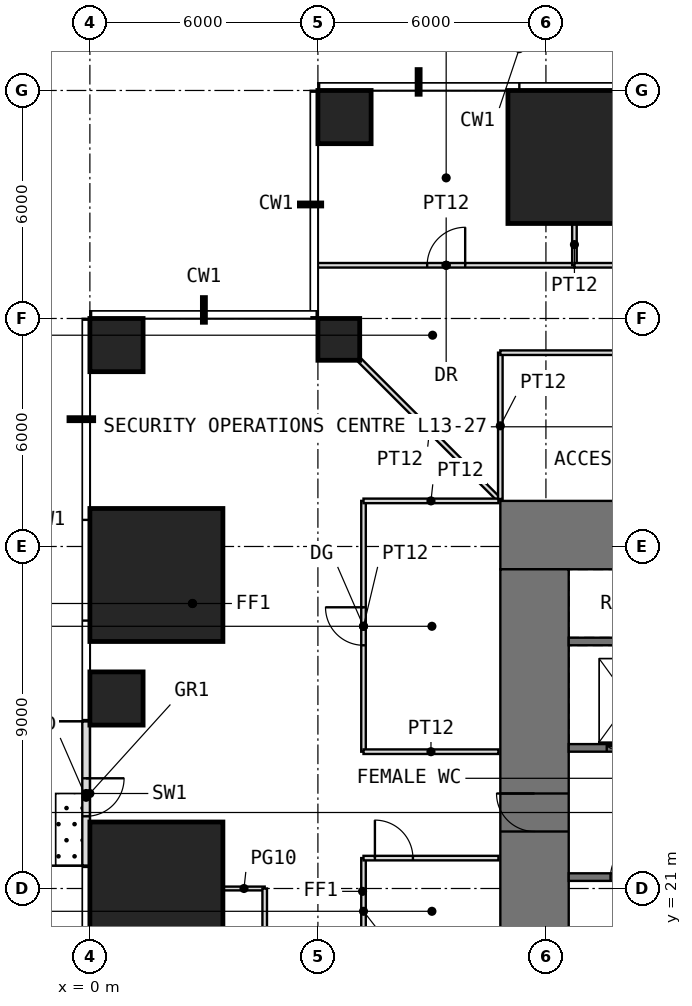
"""IFC4 building model, lengths in metres.
Left out: names, types, materials, properties, quantities, classifications, styles, units other than length and angle.
Written with IfcOpenShell. Run it as: python <this file> out.ifc"""

import sys

from ifc_helpers import new_model, si_unit, direction, frame, frame_2d, origin, origin_2d, place, context, subcontext, project, spatial, rectangle, extrude, element, fill, save


model = new_model("IFC4")
c1 = context("Model", 3, precision=1e-05, world=origin(), true_north=direction((0.0, 1.0)))
c2 = subcontext(c1, "Body", "Model", "MODEL_VIEW")
j1 = project(units=[si_unit("LENGTHUNIT", "METRE"), si_unit("PLANEANGLEUNIT", "RADIAN")], contexts=[c1])
p1 = place(None, origin())
s1 = spatial("IfcSite", under=j1, at=p1, CompositionType="ELEMENT")
p2 = place(p1, origin())
s2 = spatial("IfcBuilding", under=s1, at=p2, CompositionType="ELEMENT")
p3 = place(p2, frame((0.0, 0.0, 58.5)))
s3 = spatial("IfcBuildingStorey", under=s2, at=p3, CompositionType="ELEMENT", Elevation=58.5)
p4 = place(p3, frame((1.75, 21.0, 0.0), z_axis=(0.0, 0.0, 1.0), x_axis=(1.0, 0.0, 0.0)))
e1 = element("IfcColumn", 1, at=p4, inside=s3, PredefinedType="COLUMN", context=c2, shape_type="SweptSolid", body=[
    extrude(rectangle(XDim=3.5, YDim=3.5, at=origin_2d()), origin(), (0.0, 0.0, 1.0), 4.0),
])
p5 = place(p3, frame((0.7, 26.0, 0.0), z_axis=(0.0, 0.0, 1.0), x_axis=(1.0, 0.0, 0.0)))
e2 = element("IfcColumn", 2, at=p5, inside=s3, PredefinedType="COLUMN", context=c2, shape_type="SweptSolid", body=[
    extrude(rectangle(XDim=1.4, YDim=1.4, at=origin_2d()), origin(), (0.0, 0.0, 1.0), 4.0),
])
p6 = place(p3, frame((1.75, 29.25, 0.0), z_axis=(0.0, 0.0, 1.0), x_axis=(1.0, 0.0, 0.0)))
e3 = element("IfcColumn", 3, at=p6, inside=s3, PredefinedType="COLUMN", context=c2, shape_type="SweptSolid", body=[
    extrude(rectangle(XDim=3.5, YDim=3.5, at=origin_2d()), origin(), (0.0, 0.0, 1.0), 4.0),
])
p7 = place(p3, frame((0.7, 35.3, 0.0), z_axis=(0.0, 0.0, 1.0), x_axis=(1.0, 0.0, 0.0)))
e4 = element("IfcColumn", 4, at=p7, inside=s3, PredefinedType="COLUMN", context=c2, shape_type="SweptSolid", body=[
    extrude(rectangle(XDim=1.4, YDim=1.4, at=origin_2d()), origin(), (0.0, 0.0, 1.0), 4.0),
])
p8 = place(p3, frame((6.55, 35.45, 0.0), z_axis=(0.0, 0.0, 1.0), x_axis=(1.0, 0.0, 0.0)))
e5 = element("IfcColumn", 5, at=p8, inside=s3, PredefinedType="COLUMN", context=c2, shape_type="SweptSolid", body=[
    extrude(rectangle(XDim=1.1, YDim=1.1, at=origin_2d()), origin(), (0.0, 0.0, 1.0), 4.0),
])
p9 = place(p3, frame((6.7, 41.3, 0.0), z_axis=(0.0, 0.0, 1.0), x_axis=(1.0, 0.0, 0.0)))
e6 = element("IfcColumn", 6, at=p9, inside=s3, PredefinedType="COLUMN", context=c2, shape_type="SweptSolid", body=[
    extrude(rectangle(XDim=1.4, YDim=1.4, at=origin_2d()), origin(), (0.0, 0.0, 1.0), 4.0),
])
p10 = place(p3, frame((12.75, 40.25, 0.0), z_axis=(0.0, 0.0, 1.0), x_axis=(1.0, 0.0, 0.0)))
e7 = element("IfcColumn", 7, at=p10, inside=s3, PredefinedType="COLUMN", context=c2, shape_type="SweptSolid", body=[
    extrude(rectangle(XDim=3.5, YDim=3.5, at=origin_2d()), origin(), (0.0, 0.0, 1.0), 4.0),
])
p11 = place(p3, frame((-0.1, 25.4, 0.0), z_axis=(0.0, 0.0, 1.0), x_axis=(0.0, -1.0, 0.0)))
e8 = element("IfcWall", 8, at=p11, inside=s3, PredefinedType="USERDEFINED", context=c2, shape_type="SweptSolid", body=[
    extrude(rectangle(XDim=3.8, YDim=0.2, at=frame_2d((1.9, 0.0))), origin(), (0.0, 0.0, 1.0), 3.75),
])
p12 = place(p11, frame((1.5, 0.0, 0.0)))
e9 = element("IfcOpeningElement", 9, at=p12, cuts=e8, PredefinedType="OPENING", context=c2, shape_type="SweptSolid", body=[
    extrude(rectangle(XDim=1.0, YDim=2.4, at=frame_2d((0.5, 1.2))), frame((0.0, 0.11, 0.0), z_axis=(0.0, -1.0, 0.0), x_axis=(1.0, 0.0, 0.0)), (0.0, 0.0, 1.0), 0.22),
])
p13 = place(p3, frame((10.8, 30.3, -0.05), z_axis=(0.0, 0.0, 1.0), x_axis=(1.0, 0.0, 0.0)))
e10 = element("IfcWall", 10, at=p13, inside=s3, PredefinedType="SHEAR", context=c2, shape_type="SweptSolid", body=[
    extrude(rectangle(XDim=20.4, YDim=1.8, at=frame_2d((10.2, 0.0))), origin(), (0.0, 0.0, 1.0), 4.0),
])
p14 = place(p13, frame((9.2, 0.0, 0.05)))
e11 = element("IfcOpeningElement", 11, at=p14, cuts=e10, PredefinedType="OPENING", context=c2, shape_type="SweptSolid", body=[
    extrude(rectangle(XDim=2.0, YDim=2.2, at=frame_2d((1.0, 1.1))), frame((0.0, 0.91, 0.0), z_axis=(0.0, -1.0, 0.0), x_axis=(1.0, 0.0, 0.0)), (0.0, 0.0, 1.0), 1.82),
])
p15 = place(p3, frame((11.7, 12.6, -0.05), z_axis=(0.0, 0.0, 1.0), x_axis=(0.0, 1.0, 0.0)))
e12 = element("IfcWall", 12, at=p15, inside=s3, PredefinedType="SHEAR", context=c2, shape_type="SweptSolid", body=[
    extrude(rectangle(XDim=16.8, YDim=1.8, at=frame_2d((8.4, 0.0))), origin(), (0.0, 0.0, 1.0), 4.0),
])
p16 = place(p15, frame((9.9, 0.0, 0.05)))
e13 = element("IfcOpeningElement", 13, at=p16, cuts=e12, PredefinedType="OPENING", context=c2, shape_type="SweptSolid", body=[
    extrude(rectangle(XDim=1.0, YDim=2.2, at=frame_2d((0.5, 1.1))), frame((0.0, 0.91, 0.0), z_axis=(0.0, -1.0, 0.0), x_axis=(1.0, 0.0, 0.0)), (0.0, 0.0, 1.0), 1.82),
])
p17 = place(p3, frame((12.6, 21.3, -0.05), z_axis=(0.0, 0.0, 1.0), x_axis=(1.0, 0.0, 0.0)))
e14 = element("IfcWall", 14, at=p17, inside=s3, PredefinedType="SHEAR", context=c2, shape_type="SweptSolid", body=[
    extrude(rectangle(XDim=3.2, YDim=0.2, at=frame_2d((1.6, 0.0))), origin(), (0.0, 0.0, 1.0), 4.0),
])
p18 = place(p17, frame((1.1, 0.0, 0.05)))
e15 = element("IfcOpeningElement", 15, at=p18, cuts=e14, PredefinedType="OPENING", context=c2, shape_type="SweptSolid", body=[
    extrude(rectangle(XDim=1.0, YDim=2.2, at=frame_2d((0.5, 1.1))), frame((0.0, 0.11, 0.0), z_axis=(0.0, -1.0, 0.0), x_axis=(1.0, 0.0, 0.0)), (0.0, 0.0, 1.0), 0.22),
])
p19 = place(p3, frame((12.6, 24.7, -0.05), z_axis=(0.0, 0.0, 1.0), x_axis=(1.0, 0.0, 0.0)))
e16 = element("IfcWall", 16, at=p19, inside=s3, PredefinedType="SHEAR", context=c2, shape_type="SweptSolid", body=[
    extrude(rectangle(XDim=3.2, YDim=0.2, at=frame_2d((1.6, 0.0))), origin(), (0.0, 0.0, 1.0), 4.0),
])
p20 = place(p19, frame((1.0, 0.0, 0.05)))
e17 = element("IfcOpeningElement", 17, at=p20, cuts=e16, PredefinedType="OPENING", context=c2, shape_type="SweptSolid", body=[
    extrude(rectangle(XDim=1.2, YDim=2.2, at=frame_2d((0.6, 1.1))), frame((0.0, 0.11, 0.0), z_axis=(0.0, -1.0, 0.0), x_axis=(1.0, 0.0, 0.0)), (0.0, 0.0, 1.0), 0.22),
])
p21 = place(p3, frame((12.6, 27.5, -0.05), z_axis=(0.0, 0.0, 1.0), x_axis=(1.0, 0.0, 0.0)))
e18 = element("IfcWall", 18, at=p21, inside=s3, PredefinedType="SHEAR", context=c2, shape_type="SweptSolid", body=[
    extrude(rectangle(XDim=3.2, YDim=0.2, at=frame_2d((1.6, 0.0))), origin(), (0.0, 0.0, 1.0), 4.0),
])
p22 = place(p3, frame((3.51, 21.0, 0.0), z_axis=(0.0, 0.0, 1.0), x_axis=(1.0, 0.0, 0.0)))
e19 = element("IfcWall", 19, at=p22, inside=s3, PredefinedType="PARTITIONING", context=c2, shape_type="SweptSolid", body=[
    extrude(rectangle(XDim=1.09, YDim=0.1, at=frame_2d((0.545, 0.0))), origin(), (0.0, 0.0, 1.0), 3.75),
])
p23 = place(p3, frame((4.6, 16.0, 0.0), z_axis=(0.0, 0.0, 1.0), x_axis=(0.0, 1.0, 0.0)))
e20 = element("IfcWall", 20, at=p23, inside=s3, PredefinedType="PARTITIONING", context=c2, shape_type="SweptSolid", body=[
    extrude(rectangle(XDim=5.0, YDim=0.12, at=frame_2d((2.5, 0.0))), origin(), (0.0, 0.0, 1.0), 3.75),
])
p24 = place(p23, frame((2.1, 0.0, 0.0)))
e21 = element("IfcOpeningElement", 21, at=p24, cuts=e20, PredefinedType="OPENING", context=c2, shape_type="SweptSolid", body=[
    extrude(rectangle(XDim=1.0, YDim=2.4, at=frame_2d((0.5, 1.2))), frame((0.0, 0.07, 0.0), z_axis=(0.0, -1.0, 0.0), x_axis=(1.0, 0.0, 0.0)), (0.0, 0.0, 1.0), 0.14),
])
p25 = place(p3, frame((6.0, 37.4, 0.0), z_axis=(0.0, 0.0, 1.0), x_axis=(1.0, 0.0, 0.0)))
e22 = element("IfcWall", 22, at=p25, inside=s3, PredefinedType="PARTITIONING", context=c2, shape_type="SweptSolid", body=[
    extrude(rectangle(XDim=6.75, YDim=0.12, at=frame_2d((3.375, 0.0))), origin(), (0.0, 0.0, 1.0), 3.75),
])
p26 = place(p25, frame((2.875, 0.0, 0.0)))
e23 = element("IfcOpeningElement", 23, at=p26, cuts=e22, PredefinedType="OPENING", context=c2, shape_type="SweptSolid", body=[
    extrude(rectangle(XDim=1.0, YDim=2.2, at=frame_2d((0.5, 1.1))), frame((0.0, 0.07, 0.0), z_axis=(0.0, -1.0, 0.0), x_axis=(1.0, 0.0, 0.0)), (0.0, 0.0, 1.0), 0.14),
])
p27 = place(p3, frame((7.11, 34.89, 0.0), z_axis=(0.0, 0.0, 1.0), x_axis=(0.707106781187, -0.707106781187, 0.0)))
e24 = element("IfcWall", 24, at=p27, inside=s3, PredefinedType="PARTITIONING", context=c2, shape_type="SweptSolid", body=[
    extrude(rectangle(XDim=5.168, YDim=0.12, at=frame_2d((2.584, 0.0))), origin(), (0.0, 0.0, 1.0), 3.75),
])
p28 = place(p3, frame((7.2, 19.0, 0.0), z_axis=(0.0, 0.0, 1.0), x_axis=(0.0, 1.0, 0.0)))
e25 = element("IfcWall", 25, at=p28, inside=s3, PredefinedType="PARTITIONING", context=c2, shape_type="SweptSolid", body=[
    extrude(rectangle(XDim=2.8, YDim=0.12, at=frame_2d((1.4, 0.0))), origin(), (0.0, 0.0, 1.0), 3.75),
])
p29 = place(p3, frame((7.2, 21.8, 0.0), z_axis=(0.0, 0.0, 1.0), x_axis=(1.0, 0.0, 0.0)))
e26 = element("IfcWall", 26, at=p29, inside=s3, PredefinedType="PARTITIONING", context=c2, shape_type="SweptSolid", body=[
    extrude(rectangle(XDim=3.55, YDim=0.12, at=frame_2d((1.775, 0.0))), origin(), (0.0, 0.0, 1.0), 3.75),
])
p30 = place(p29, frame((0.3, 0.0, 0.0)))
e27 = element("IfcOpeningElement", 27, at=p30, cuts=e26, PredefinedType="OPENING", context=c2, shape_type="SweptSolid", body=[
    extrude(rectangle(XDim=1.0, YDim=2.4, at=frame_2d((0.5, 1.2))), frame((0.0, 0.07, 0.0), z_axis=(0.0, -1.0, 0.0), x_axis=(1.0, 0.0, 0.0)), (0.0, 0.0, 1.0), 0.14),
])
p31 = place(p3, frame((7.2, 24.6, 0.0), z_axis=(0.0, 0.0, 1.0), x_axis=(0.0, 1.0, 0.0)))
e28 = element("IfcWall", 28, at=p31, inside=s3, PredefinedType="PARTITIONING", context=c2, shape_type="SweptSolid", body=[
    extrude(rectangle(XDim=6.6, YDim=0.12, at=frame_2d((3.3, 0.0))), origin(), (0.0, 0.0, 1.0), 3.75),
])
p32 = place(p31, frame((2.8, 0.0, 0.0)))
e29 = element("IfcOpeningElement", 29, at=p32, cuts=e28, PredefinedType="OPENING", context=c2, shape_type="SweptSolid", body=[
    extrude(rectangle(XDim=1.0, YDim=2.4, at=frame_2d((0.5, 1.2))), frame((0.0, 0.07, 0.0), z_axis=(0.0, -1.0, 0.0), x_axis=(1.0, 0.0, 0.0)), (0.0, 0.0, 1.0), 0.14),
])
for number, where, z_axis, x_axis in (
    (30, (7.2, 24.6, 0.0), (0.0, 0.0, 1.0), (1.0, 0.0, 0.0)),
    (31, (7.2, 31.2, 0.0), (0.0, 0.0, 1.0), (1.0, 0.0, 0.0)),
):
    element("IfcWall", number, at=place(p3, frame(where, z_axis=z_axis, x_axis=x_axis)), inside=s3, PredefinedType="PARTITIONING", context=c2, shape_type="SweptSolid", body=[
        extrude(rectangle(XDim=3.55, YDim=0.12, at=frame_2d((1.775, 0.0))), origin(), (0.0, 0.0, 1.0), 3.75),
    ])
p33 = place(p3, frame((10.8, 31.25, 0.0), z_axis=(0.0, 0.0, 1.0), x_axis=(0.0, 1.0, 0.0)))
e32 = element("IfcWall", 32, at=p33, inside=s3, PredefinedType="PARTITIONING", context=c2, shape_type="SweptSolid", body=[
    extrude(rectangle(XDim=3.85, YDim=0.12, at=frame_2d((1.925, 0.0))), origin(), (0.0, 0.0, 1.0), 3.75),
])
p34 = place(p3, frame((10.8, 35.1, 0.0), z_axis=(0.0, 0.0, 1.0), x_axis=(1.0, 0.0, 0.0)))
e33 = element("IfcWall", 33, at=p34, inside=s3, PredefinedType="PARTITIONING", context=c2, shape_type="SweptSolid", body=[
    extrude(rectangle(XDim=7.6, YDim=0.12, at=frame_2d((3.8, 0.0))), origin(), (0.0, 0.0, 1.0), 3.75),
])
p35 = place(p34, frame((3.3, 0.0, 0.0)))
e34 = element("IfcOpeningElement", 34, at=p35, cuts=e33, PredefinedType="OPENING", context=c2, shape_type="SweptSolid", body=[
    extrude(rectangle(XDim=1.0, YDim=2.2, at=frame_2d((0.5, 1.1))), frame((0.0, 0.07, 0.0), z_axis=(0.0, -1.0, 0.0), x_axis=(1.0, 0.0, 0.0)), (0.0, 0.0, 1.0), 0.14),
])
p36 = place(p3, frame((12.75, 37.4, 0.0), z_axis=(0.0, 0.0, 1.0), x_axis=(0.0, 1.0, 0.0)))
e35 = element("IfcWall", 35, at=p36, inside=s3, PredefinedType="PARTITIONING", context=c2, shape_type="SweptSolid", body=[
    extrude(rectangle(XDim=1.09, YDim=0.12, at=frame_2d((0.545, 0.0))), origin(), (0.0, 0.0, 1.0), 3.75),
])
p37 = place(p3, frame((12.75, 37.4, 0.0), z_axis=(0.0, 0.0, 1.0), x_axis=(1.0, 0.0, 0.0)))
e36 = element("IfcWall", 36, at=p37, inside=s3, PredefinedType="PARTITIONING", context=c2, shape_type="SweptSolid", body=[
    extrude(rectangle(XDim=8.25, YDim=0.12, at=frame_2d((4.125, 0.0))), origin(), (0.0, 0.0, 1.0), 3.75),
])
p38 = place(p37, frame((3.625, 0.0, 0.0)))
e37 = element("IfcOpeningElement", 37, at=p38, cuts=e36, PredefinedType="OPENING", context=c2, shape_type="SweptSolid", body=[
    extrude(rectangle(XDim=1.0, YDim=2.4, at=frame_2d((0.5, 1.2))), frame((0.0, 0.07, 0.0), z_axis=(0.0, -1.0, 0.0), x_axis=(1.0, 0.0, 0.0)), (0.0, 0.0, 1.0), 0.14),
])
p39 = place(p12, origin())
e38 = element("IfcDoor", 38, at=p39, inside=s3, OperationType="SINGLE_SWING_LEFT", PredefinedType="DOOR", context=c2, shape_type="SweptSolid", body=[
    extrude(rectangle(XDim=1.0, YDim=2.4, at=frame_2d((0.5, 1.2))), frame((0.0, 0.025, 0.0), z_axis=(0.0, -1.0, 0.0), x_axis=(1.0, 0.0, 0.0)), (0.0, 0.0, 1.0), 0.05),
])
fill(e9, e38)
p40 = place(p16, origin())
e39 = element("IfcDoor", 39, at=p40, inside=s3, OperationType="SINGLE_SWING_RIGHT", PredefinedType="DOOR", context=c2, shape_type="SweptSolid", body=[
    extrude(rectangle(XDim=1.0, YDim=2.2, at=frame_2d((0.5, 1.1))), frame((0.0, 0.025, 0.0), z_axis=(0.0, -1.0, 0.0), x_axis=(1.0, 0.0, 0.0)), (0.0, 0.0, 1.0), 0.05),
])
fill(e13, e39)
p41 = place(p18, origin())
e40 = element("IfcDoor", 40, at=p41, inside=s3, OperationType="SINGLE_SWING_RIGHT", PredefinedType="DOOR", context=c2, shape_type="SweptSolid", body=[
    extrude(rectangle(XDim=1.0, YDim=2.2, at=frame_2d((0.5, 1.1))), frame((0.0, 0.025, 0.0), z_axis=(0.0, -1.0, 0.0), x_axis=(1.0, 0.0, 0.0)), (0.0, 0.0, 1.0), 0.05),
])
fill(e15, e40)
p42 = place(p26, origin())
e41 = element("IfcDoor", 41, at=p42, inside=s3, OperationType="SINGLE_SWING_RIGHT", PredefinedType="DOOR", context=c2, shape_type="SweptSolid", body=[
    extrude(rectangle(XDim=1.0, YDim=2.2, at=frame_2d((0.5, 1.1))), frame((0.0, 0.025, 0.0), z_axis=(0.0, -1.0, 0.0), x_axis=(1.0, 0.0, 0.0)), (0.0, 0.0, 1.0), 0.05),
])
fill(e23, e41)
p43 = place(p32, origin())
e42 = element("IfcDoor", 42, at=p43, inside=s3, OperationType="SINGLE_SWING_RIGHT", PredefinedType="DOOR", context=c2, shape_type="SweptSolid", body=[
    extrude(rectangle(XDim=1.0, YDim=2.4, at=frame_2d((0.5, 1.2))), frame((0.0, 0.025, 0.0), z_axis=(0.0, -1.0, 0.0), x_axis=(1.0, 0.0, 0.0)), (0.0, 0.0, 1.0), 0.05),
])
fill(e29, e42)
p44 = place(p30, origin())
e43 = element("IfcDoor", 43, at=p44, inside=s3, OperationType="SINGLE_SWING_LEFT", PredefinedType="DOOR", context=c2, shape_type="SweptSolid", body=[
    extrude(rectangle(XDim=1.0, YDim=2.4, at=frame_2d((0.5, 1.2))), frame((0.0, 0.025, 0.0), z_axis=(0.0, -1.0, 0.0), x_axis=(1.0, 0.0, 0.0)), (0.0, 0.0, 1.0), 0.05),
])
fill(e27, e43)
p45 = place(p20, origin())
e44 = element("IfcDoor", 44, at=p45, inside=s3, OperationType="DOUBLE_DOOR_SLIDING", PredefinedType="DOOR", context=c2, shape_type="SweptSolid", body=[
    extrude(rectangle(XDim=1.2, YDim=2.2, at=frame_2d((0.6, 1.1))), frame((0.0, 0.025, 0.0), z_axis=(0.0, -1.0, 0.0), x_axis=(1.0, 0.0, 0.0)), (0.0, 0.0, 1.0), 0.05),
])
fill(e17, e44)
save(model, sys.argv[1])
